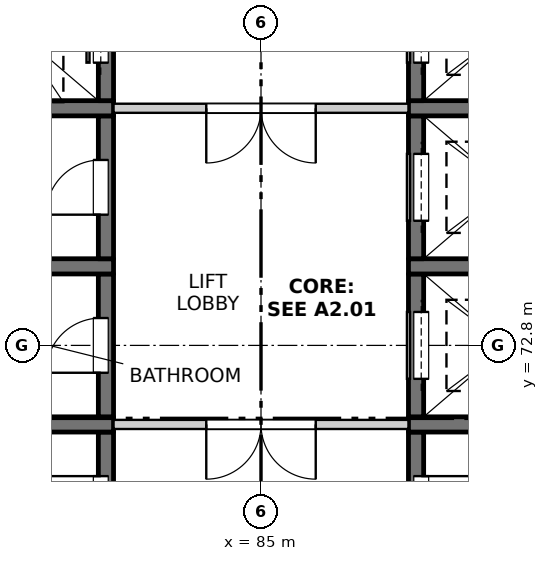
"""IFC4 building model, lengths in metres.
Left out: names, types, materials, properties, quantities, classifications, styles, units other than length and angle.
Written with IfcOpenShell. Run it as: python <this file> out.ifc"""

import sys

from ifc_helpers import new_model, si_unit, direction, frame, frame_2d, origin, place, context, subcontext, project, spatial, rectangle, extrude, element, fill, save


model = new_model("IFC4")
c1 = context("Model", 3, precision=1e-05, world=origin(), true_north=direction((0.0, 1.0)))
c2 = subcontext(c1, "Body", "Model", "MODEL_VIEW")
j1 = project(units=[si_unit("LENGTHUNIT", "METRE"), si_unit("PLANEANGLEUNIT", "RADIAN")], contexts=[c1])
p1 = place(None, origin())
s1 = spatial("IfcSite", under=j1, at=p1, CompositionType="ELEMENT")
p2 = place(p1, origin())
s2 = spatial("IfcBuilding", under=s1, at=p2, CompositionType="ELEMENT")
p3 = place(p2, frame((0.0, 0.0, 197.3)))
s3 = spatial("IfcBuildingStorey", under=s2, at=p3, CompositionType="ELEMENT", Elevation=197.3)
p4 = place(p3, frame((82.45, 69.025, -0.3), z_axis=(0.0, 0.0, 1.0), x_axis=(0.0, 1.0, 0.0)))
e1 = element("IfcWall", 1, at=p4, inside=s3, PredefinedType="SOLIDWALL", context=c2, shape_type="SweptSolid", body=[
    extrude(rectangle(XDim=2.35, YDim=0.25, at=frame_2d((1.175, 0.0))), origin(), (0.0, 0.0, 1.0), 3.45),
])
p5 = place(p4, frame((0.725, 0.0, 0.3)))
e2 = element("IfcOpeningElement", 2, at=p5, cuts=e1, PredefinedType="OPENING", context=c2, shape_type="SweptSolid", body=[
    extrude(rectangle(XDim=0.9, YDim=2.1, at=frame_2d((0.45, 1.05))), frame((0.0, 0.135, 0.0), z_axis=(0.0, -1.0, 0.0), x_axis=(1.0, 0.0, 0.0)), (0.0, 0.0, 1.0), 0.27),
])
p6 = place(p3, frame((79.575, 71.5, -0.3), z_axis=(0.0, 0.0, 1.0), x_axis=(1.0, 0.0, 0.0)))
e3 = element("IfcWall", 3, at=p6, inside=s3, PredefinedType="SOLIDWALL", context=c2, shape_type="SweptSolid", body=[
    extrude(rectangle(XDim=3.0, YDim=0.25, at=frame_2d((1.5, 0.0))), origin(), (0.0, 0.0, 1.0), 3.45),
])
p7 = place(p3, frame((82.45, 71.625, -0.3), z_axis=(0.0, 0.0, 1.0), x_axis=(0.0, 1.0, 0.0)))
e4 = element("IfcWall", 4, at=p7, inside=s3, PredefinedType="SOLIDWALL", context=c2, shape_type="SweptSolid", body=[
    extrude(rectangle(XDim=2.35, YDim=0.25, at=frame_2d((1.175, 0.0))), origin(), (0.0, 0.0, 1.0), 3.45),
])
p8 = place(p7, frame((0.725, 0.0, 0.3)))
e5 = element("IfcOpeningElement", 5, at=p8, cuts=e4, PredefinedType="OPENING", context=c2, shape_type="SweptSolid", body=[
    extrude(rectangle(XDim=0.9, YDim=2.1, at=frame_2d((0.45, 1.05))), frame((0.0, 0.135, 0.0), z_axis=(0.0, -1.0, 0.0), x_axis=(1.0, 0.0, 0.0)), (0.0, 0.0, 1.0), 0.27),
])
p9 = place(p3, frame((79.575, 74.1, -0.3), z_axis=(0.0, 0.0, 1.0), x_axis=(1.0, 0.0, 0.0)))
e6 = element("IfcWall", 6, at=p9, inside=s3, PredefinedType="SOLIDWALL", context=c2, shape_type="SweptSolid", body=[
    extrude(rectangle(XDim=3.0, YDim=0.25, at=frame_2d((1.5, 0.0))), origin(), (0.0, 0.0, 1.0), 3.45),
])
p10 = place(p3, frame((82.45, 74.225, -0.3), z_axis=(0.0, 0.0, 1.0), x_axis=(0.0, 1.0, 0.0)))
e7 = element("IfcWall", 7, at=p10, inside=s3, PredefinedType="SOLIDWALL", context=c2, shape_type="SweptSolid", body=[
    extrude(rectangle(XDim=2.35, YDim=0.25, at=frame_2d((1.175, 0.0))), origin(), (0.0, 0.0, 1.0), 3.45),
])
p11 = place(p10, frame((0.725, 0.0, 0.3)))
e8 = element("IfcOpeningElement", 8, at=p11, cuts=e7, PredefinedType="OPENING", context=c2, shape_type="SweptSolid", body=[
    extrude(rectangle(XDim=0.9, YDim=2.1, at=frame_2d((0.45, 1.05))), frame((0.0, 0.135, 0.0), z_axis=(0.0, -1.0, 0.0), x_axis=(1.0, 0.0, 0.0)), (0.0, 0.0, 1.0), 0.27),
])
p12 = place(p3, frame((79.575, 76.7, -0.3), z_axis=(0.0, 0.0, 1.0), x_axis=(1.0, 0.0, 0.0)))
e9 = element("IfcWall", 9, at=p12, inside=s3, PredefinedType="SOLIDWALL", context=c2, shape_type="SweptSolid", body=[
    extrude(rectangle(XDim=3.0, YDim=0.25, at=frame_2d((1.5, 0.0))), origin(), (0.0, 0.0, 1.0), 3.45),
])
p13 = place(p3, frame((82.45, 76.825, -0.3), z_axis=(0.0, 0.0, 1.0), x_axis=(0.0, 1.0, 0.0)))
e10 = element("IfcWall", 10, at=p13, inside=s3, PredefinedType="SOLIDWALL", context=c2, shape_type="SweptSolid", body=[
    extrude(rectangle(XDim=2.35, YDim=0.25, at=frame_2d((1.175, 0.0))), origin(), (0.0, 0.0, 1.0), 3.45),
])
p14 = place(p13, frame((0.625, 0.0, 0.3)))
e11 = element("IfcOpeningElement", 11, at=p14, cuts=e10, PredefinedType="OPENING", context=c2, shape_type="SweptSolid", body=[
    extrude(rectangle(XDim=1.1, YDim=2.1, at=frame_2d((0.55, 1.05))), frame((0.0, 0.135, 0.0), z_axis=(0.0, -1.0, 0.0), x_axis=(1.0, 0.0, 0.0)), (0.0, 0.0, 1.0), 0.27),
])
p15 = place(p3, frame((87.55, 69.025, -0.3), z_axis=(0.0, 0.0, 1.0), x_axis=(0.0, 1.0, 0.0)))
e12 = element("IfcWall", 12, at=p15, inside=s3, PredefinedType="SOLIDWALL", context=c2, shape_type="SweptSolid", body=[
    extrude(rectangle(XDim=2.35, YDim=0.25, at=frame_2d((1.175, 0.0))), origin(), (0.0, 0.0, 1.0), 3.45),
])
p16 = place(p15, frame((0.725, 0.0, 0.3)))
e13 = element("IfcOpeningElement", 13, at=p16, cuts=e12, PredefinedType="OPENING", context=c2, shape_type="SweptSolid", body=[
    extrude(rectangle(XDim=0.9, YDim=2.1, at=frame_2d((0.45, 1.05))), frame((0.0, 0.135, 0.0), z_axis=(0.0, -1.0, 0.0), x_axis=(1.0, 0.0, 0.0)), (0.0, 0.0, 1.0), 0.27),
])
p17 = place(p3, frame((87.425, 71.5, -0.3), z_axis=(0.0, 0.0, 1.0), x_axis=(1.0, 0.0, 0.0)))
e14 = element("IfcWall", 14, at=p17, inside=s3, PredefinedType="SOLIDWALL", context=c2, shape_type="SweptSolid", body=[
    extrude(rectangle(XDim=3.0, YDim=0.25, at=frame_2d((1.5, 0.0))), origin(), (0.0, 0.0, 1.0), 3.45),
])
p18 = place(p3, frame((87.55, 71.625, -0.3), z_axis=(0.0, 0.0, 1.0), x_axis=(0.0, 1.0, 0.0)))
e15 = element("IfcWall", 15, at=p18, inside=s3, PredefinedType="SOLIDWALL", context=c2, shape_type="SweptSolid", body=[
    extrude(rectangle(XDim=2.35, YDim=0.25, at=frame_2d((1.175, 0.0))), origin(), (0.0, 0.0, 1.0), 3.45),
])
p19 = place(p18, frame((0.625, 0.0, 0.3)))
e16 = element("IfcOpeningElement", 16, at=p19, cuts=e15, PredefinedType="OPENING", context=c2, shape_type="SweptSolid", body=[
    extrude(rectangle(XDim=1.1, YDim=2.1, at=frame_2d((0.55, 1.05))), frame((0.0, 0.135, 0.0), z_axis=(0.0, -1.0, 0.0), x_axis=(1.0, 0.0, 0.0)), (0.0, 0.0, 1.0), 0.27),
])
p20 = place(p3, frame((87.425, 74.1, -0.3), z_axis=(0.0, 0.0, 1.0), x_axis=(1.0, 0.0, 0.0)))
e17 = element("IfcWall", 17, at=p20, inside=s3, PredefinedType="SOLIDWALL", context=c2, shape_type="SweptSolid", body=[
    extrude(rectangle(XDim=3.0, YDim=0.25, at=frame_2d((1.5, 0.0))), origin(), (0.0, 0.0, 1.0), 3.45),
])
p21 = place(p3, frame((87.55, 74.225, -0.3), z_axis=(0.0, 0.0, 1.0), x_axis=(0.0, 1.0, 0.0)))
e18 = element("IfcWall", 18, at=p21, inside=s3, PredefinedType="SOLIDWALL", context=c2, shape_type="SweptSolid", body=[
    extrude(rectangle(XDim=2.35, YDim=0.25, at=frame_2d((1.175, 0.0))), origin(), (0.0, 0.0, 1.0), 3.45),
])
p22 = place(p21, frame((0.625, 0.0, 0.3)))
e19 = element("IfcOpeningElement", 19, at=p22, cuts=e18, PredefinedType="OPENING", context=c2, shape_type="SweptSolid", body=[
    extrude(rectangle(XDim=1.1, YDim=2.1, at=frame_2d((0.55, 1.05))), frame((0.0, 0.135, 0.0), z_axis=(0.0, -1.0, 0.0), x_axis=(1.0, 0.0, 0.0)), (0.0, 0.0, 1.0), 0.27),
])
p23 = place(p3, frame((87.425, 76.7, -0.3), z_axis=(0.0, 0.0, 1.0), x_axis=(1.0, 0.0, 0.0)))
e20 = element("IfcWall", 20, at=p23, inside=s3, PredefinedType="SOLIDWALL", context=c2, shape_type="SweptSolid", body=[
    extrude(rectangle(XDim=3.0, YDim=0.25, at=frame_2d((1.5, 0.0))), origin(), (0.0, 0.0, 1.0), 3.45),
])
p24 = place(p3, frame((87.55, 76.825, -0.3), z_axis=(0.0, 0.0, 1.0), x_axis=(0.0, 1.0, 0.0)))
e21 = element("IfcWall", 21, at=p24, inside=s3, PredefinedType="SOLIDWALL", context=c2, shape_type="SweptSolid", body=[
    extrude(rectangle(XDim=2.35, YDim=0.25, at=frame_2d((1.175, 0.0))), origin(), (0.0, 0.0, 1.0), 3.45),
])
p25 = place(p24, frame((0.625, 0.0, 0.3)))
e22 = element("IfcOpeningElement", 22, at=p25, cuts=e21, PredefinedType="OPENING", context=c2, shape_type="SweptSolid", body=[
    extrude(rectangle(XDim=1.1, YDim=2.1, at=frame_2d((0.55, 1.05))), frame((0.0, 0.135, 0.0), z_axis=(0.0, -1.0, 0.0), x_axis=(1.0, 0.0, 0.0)), (0.0, 0.0, 1.0), 0.27),
])
p26 = place(p3, frame((82.575, 71.5, 0.0), z_axis=(0.0, 0.0, 1.0), x_axis=(1.0, 0.0, 0.0)))
e23 = element("IfcWall", 23, at=p26, inside=s3, PredefinedType="PARTITIONING", context=c2, shape_type="SweptSolid", body=[
    extrude(rectangle(XDim=4.85, YDim=0.15, at=frame_2d((2.425, 0.0))), origin(), (0.0, 0.0, 1.0), 3.15),
])
p27 = place(p26, frame((1.525, 0.0, 0.0)))
e24 = element("IfcOpeningElement", 24, at=p27, cuts=e23, PredefinedType="OPENING", context=c2, shape_type="SweptSolid", body=[
    extrude(rectangle(XDim=1.8, YDim=2.1, at=frame_2d((0.9, 1.05))), frame((0.0, 0.085, 0.0), z_axis=(0.0, -1.0, 0.0), x_axis=(1.0, 0.0, 0.0)), (0.0, 0.0, 1.0), 0.17),
])
p28 = place(p3, frame((82.575, 76.7, 0.0), z_axis=(0.0, 0.0, 1.0), x_axis=(1.0, 0.0, 0.0)))
e25 = element("IfcWall", 25, at=p28, inside=s3, PredefinedType="PARTITIONING", context=c2, shape_type="SweptSolid", body=[
    extrude(rectangle(XDim=4.85, YDim=0.15, at=frame_2d((2.425, 0.0))), origin(), (0.0, 0.0, 1.0), 3.15),
])
p29 = place(p28, frame((1.525, 0.0, 0.0)))
e26 = element("IfcOpeningElement", 26, at=p29, cuts=e25, PredefinedType="OPENING", context=c2, shape_type="SweptSolid", body=[
    extrude(rectangle(XDim=1.8, YDim=2.1, at=frame_2d((0.9, 1.05))), frame((0.0, 0.085, 0.0), z_axis=(0.0, -1.0, 0.0), x_axis=(1.0, 0.0, 0.0)), (0.0, 0.0, 1.0), 0.17),
])
p30 = place(p5, origin())
e27 = element("IfcDoor", 27, at=p30, inside=s3, OperationType="SINGLE_SWING_RIGHT", PredefinedType="DOOR", context=c2, shape_type="SweptSolid", body=[
    extrude(rectangle(XDim=0.9, YDim=2.1, at=frame_2d((0.45, 1.05))), frame((0.0, 0.11, 0.0), z_axis=(0.0, -1.0, 0.0), x_axis=(1.0, 0.0, 0.0)), (0.0, 0.0, 1.0), 0.05),
])
fill(e2, e27)
p31 = place(p16, origin())
e28 = element("IfcDoor", 28, at=p31, inside=s3, OperationType="SINGLE_SWING_LEFT", PredefinedType="DOOR", context=c2, shape_type="SweptSolid", body=[
    extrude(rectangle(XDim=0.9, YDim=2.1, at=frame_2d((0.45, 1.05))), frame((0.0, -0.06, 0.0), z_axis=(0.0, -1.0, 0.0), x_axis=(1.0, 0.0, 0.0)), (0.0, 0.0, 1.0), 0.05),
])
fill(e13, e28)
p32 = place(p27, origin())
e29 = element("IfcDoor", 29, at=p32, inside=s3, OperationType="DOUBLE_DOOR_SINGLE_SWING", PredefinedType="DOOR", context=c2, shape_type="SweptSolid", body=[
    extrude(rectangle(XDim=1.8, YDim=2.1, at=frame_2d((0.9, 1.05))), frame((0.0, 0.025, 0.0), z_axis=(0.0, -1.0, 0.0), x_axis=(1.0, 0.0, 0.0)), (0.0, 0.0, 1.0), 0.05),
])
fill(e24, e29)
p33 = place(p8, origin())
e30 = element("IfcDoor", 30, at=p33, inside=s3, OperationType="SINGLE_SWING_LEFT", PredefinedType="DOOR", context=c2, shape_type="SweptSolid", body=[
    extrude(rectangle(XDim=0.9, YDim=2.1, at=frame_2d((0.45, 1.05))), frame((0.0, 0.11, 0.0), z_axis=(0.0, -1.0, 0.0), x_axis=(1.0, 0.0, 0.0)), (0.0, 0.0, 1.0), 0.05),
])
fill(e5, e30)
p34 = place(p19, origin())
e31 = element("IfcDoor", 31, at=p34, inside=s3, OperationType="SLIDING_TO_LEFT", PredefinedType="DOOR", context=c2, shape_type="SweptSolid", body=[
    extrude(rectangle(XDim=1.1, YDim=2.1, at=frame_2d((0.55, 1.05))), frame((0.0, -0.06, 0.0), z_axis=(0.0, -1.0, 0.0), x_axis=(1.0, 0.0, 0.0)), (0.0, 0.0, 1.0), 0.05),
])
fill(e16, e31)
p35 = place(p11, origin())
e32 = element("IfcDoor", 32, at=p35, inside=s3, OperationType="SINGLE_SWING_LEFT", PredefinedType="DOOR", context=c2, shape_type="SweptSolid", body=[
    extrude(rectangle(XDim=0.9, YDim=2.1, at=frame_2d((0.45, 1.05))), frame((0.0, 0.11, 0.0), z_axis=(0.0, -1.0, 0.0), x_axis=(1.0, 0.0, 0.0)), (0.0, 0.0, 1.0), 0.05),
])
fill(e8, e32)
p36 = place(p22, origin())
e33 = element("IfcDoor", 33, at=p36, inside=s3, OperationType="SLIDING_TO_LEFT", PredefinedType="DOOR", context=c2, shape_type="SweptSolid", body=[
    extrude(rectangle(XDim=1.1, YDim=2.1, at=frame_2d((0.55, 1.05))), frame((0.0, -0.06, 0.0), z_axis=(0.0, -1.0, 0.0), x_axis=(1.0, 0.0, 0.0)), (0.0, 0.0, 1.0), 0.05),
])
fill(e19, e33)
p37 = place(p29, origin())
e34 = element("IfcDoor", 34, at=p37, inside=s3, OperationType="DOUBLE_DOOR_SINGLE_SWING", PredefinedType="DOOR", context=c2, shape_type="SweptSolid", body=[
    extrude(rectangle(XDim=1.8, YDim=2.1, at=frame_2d((0.9, 1.05))), frame((0.0, 0.025, 0.0), z_axis=(0.0, -1.0, 0.0), x_axis=(1.0, 0.0, 0.0)), (0.0, 0.0, 1.0), 0.05),
])
fill(e26, e34)
p38 = place(p14, origin())
e35 = element("IfcDoor", 35, at=p38, inside=s3, OperationType="SLIDING_TO_LEFT", PredefinedType="DOOR", context=c2, shape_type="SweptSolid", body=[
    extrude(rectangle(XDim=1.1, YDim=2.1, at=frame_2d((0.55, 1.05))), frame((0.0, 0.11, 0.0), z_axis=(0.0, -1.0, 0.0), x_axis=(1.0, 0.0, 0.0)), (0.0, 0.0, 1.0), 0.05),
])
fill(e11, e35)
p39 = place(p25, origin())
e36 = element("IfcDoor", 36, at=p39, inside=s3, OperationType="SLIDING_TO_LEFT", PredefinedType="DOOR", context=c2, shape_type="SweptSolid", body=[
    extrude(rectangle(XDim=1.1, YDim=2.1, at=frame_2d((0.55, 1.05))), frame((0.0, -0.06, 0.0), z_axis=(0.0, -1.0, 0.0), x_axis=(1.0, 0.0, 0.0)), (0.0, 0.0, 1.0), 0.05),
])
fill(e22, e36)
save(model, sys.argv[1])
